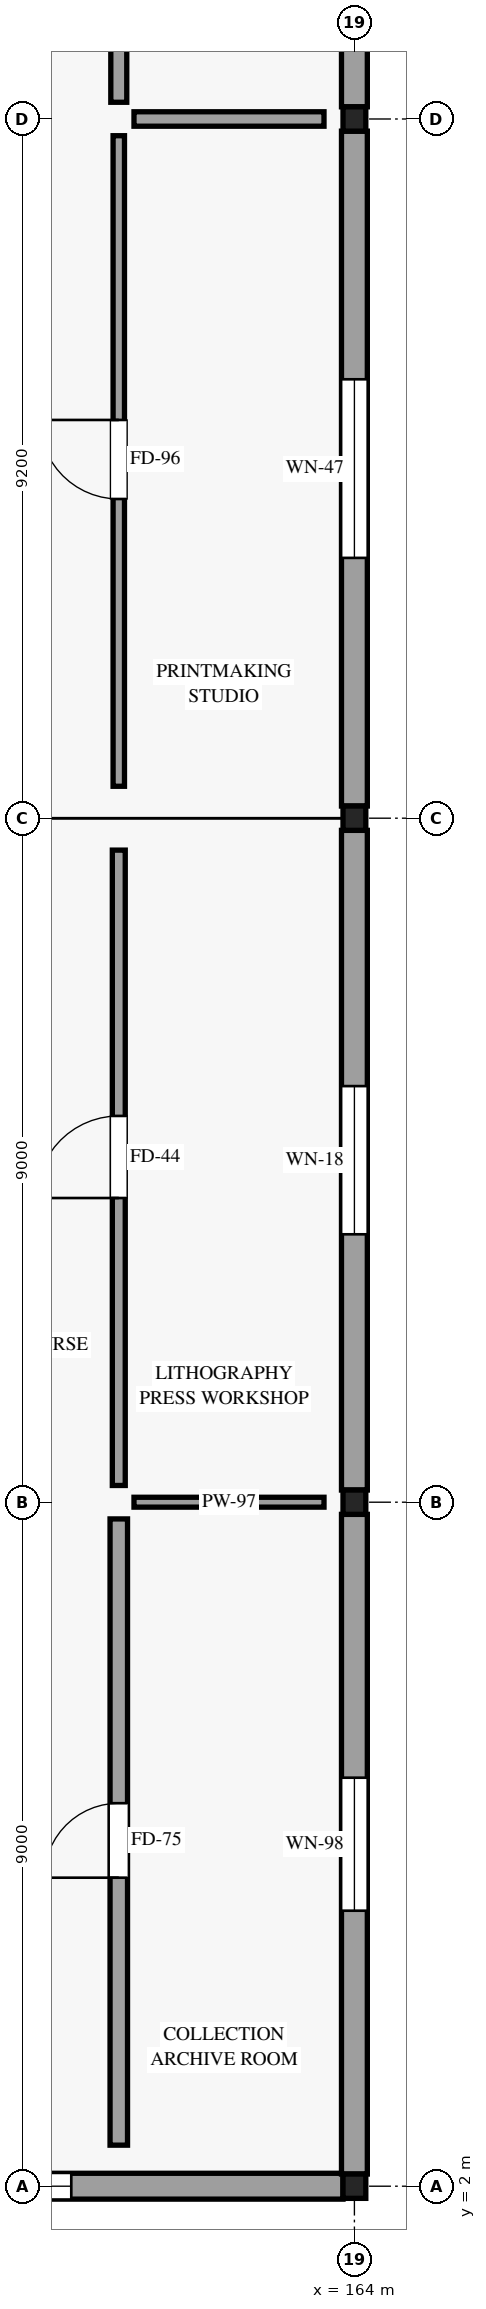
"""IFC4 building model, lengths in metres.
Left out: names, types, materials, properties, quantities, classifications, styles, units other than length and angle.
Written with IfcOpenShell. Run it as: python <this file> out.ifc"""

import sys

from ifc_helpers import new_model, si_unit, direction, frame, frame_2d, origin, origin_2d, place, context, subcontext, project, spatial, rectangle, i_section, extrude, element, fill, save


model = new_model("IFC4")
c1 = context("Model", 3, precision=1e-05, world=origin(), true_north=direction((0.0, 1.0)))
c2 = subcontext(c1, "Body", "Model", "MODEL_VIEW")
j1 = project(units=[si_unit("LENGTHUNIT", "METRE"), si_unit("PLANEANGLEUNIT", "RADIAN")], contexts=[c1])
p1 = place(None, origin())
s1 = spatial("IfcSite", under=j1, at=p1, CompositionType="ELEMENT")
p2 = place(p1, origin())
s2 = spatial("IfcBuilding", under=s1, at=p2, CompositionType="ELEMENT")
p3 = place(p2, frame((0.0, 0.0, 5.4)))
s3 = spatial("IfcBuildingStorey", under=s2, at=p3, CompositionType="ELEMENT", Elevation=5.4)
for number, where, z_axis, x_axis in (
    (1, (164.0, 2.0, 0.0), (0.0, 0.0, 1.0), (1.0, 0.0, 0.0)),
    (2, (164.0, 11.0, 0.0), (0.0, 0.0, 1.0), (1.0, 0.0, 0.0)),
    (3, (164.0, 20.0, 0.0), (0.0, 0.0, 1.0), (1.0, 0.0, 0.0)),
    (4, (164.0, 29.2, 0.0), (0.0, 0.0, 1.0), (1.0, 0.0, 0.0)),
):
    element("IfcColumn", number, at=place(p3, frame(where, z_axis=z_axis, x_axis=x_axis)), inside=s3, PredefinedType="COLUMN", context=c2, shape_type="SweptSolid", body=[
        extrude(i_section(OverallWidth=0.3, OverallDepth=0.32, WebThickness=0.011, FlangeThickness=0.021, FilletRadius=0.027, at=origin_2d()), origin(), (0.0, 0.0, 1.0), 4.8),
    ])
p4 = place(p3, frame((155.15, 2.0, 0.0), z_axis=(0.0, 0.0, 1.0), x_axis=(1.0, 0.0, 0.0)))
e5 = element("IfcWall", 5, at=p4, inside=s3, PredefinedType="STANDARD", context=c2, shape_type="SweptSolid", body=[
    extrude(rectangle(XDim=8.7, YDim=0.34, at=frame_2d((4.35, 0.0))), origin(), (0.0, 0.0, 1.0), 3.985),
])
p5 = place(p4, frame((5.125, 0.0, 0.85), z_axis=(0.0, 0.0, 1.0), x_axis=(-1.0, 0.0, 0.0)))
e6 = element("IfcOpeningElement", 6, at=p5, cuts=e5, PredefinedType="OPENING", context=c2, shape_type="SweptSolid", body=[
    extrude(rectangle(XDim=1.55, YDim=1.95, at=frame_2d((0.775, 0.975))), frame((0.0, 0.18, 0.0), z_axis=(0.0, -1.0, 0.0), x_axis=(1.0, 0.0, 0.0)), (0.0, 0.0, 1.0), 0.36),
])
p6 = place(p3, frame((164.0, 2.16, 0.0), z_axis=(0.0, 0.0, 1.0), x_axis=(0.0, 1.0, 0.0)))
e7 = element("IfcWall", 7, at=p6, inside=s3, PredefinedType="STANDARD", context=c2, shape_type="SweptSolid", body=[
    extrude(rectangle(XDim=8.68, YDim=0.34, at=frame_2d((4.34, 0.0))), origin(), (0.0, 0.0, 1.0), 3.985),
])
p7 = place(p6, frame((5.215, 0.0, 0.85), z_axis=(0.0, 0.0, 1.0), x_axis=(-1.0, 0.0, 0.0)))
e8 = element("IfcOpeningElement", 8, at=p7, cuts=e7, PredefinedType="OPENING", context=c2, shape_type="SweptSolid", body=[
    extrude(rectangle(XDim=1.75, YDim=2.05, at=frame_2d((0.875, 1.025))), frame((0.0, 0.18, 0.0), z_axis=(0.0, -1.0, 0.0), x_axis=(1.0, 0.0, 0.0)), (0.0, 0.0, 1.0), 0.36),
])
p8 = place(p3, frame((164.0, 11.16, 0.0), z_axis=(0.0, 0.0, 1.0), x_axis=(0.0, 1.0, 0.0)))
e9 = element("IfcWall", 9, at=p8, inside=s3, PredefinedType="STANDARD", context=c2, shape_type="SweptSolid", body=[
    extrude(rectangle(XDim=8.68, YDim=0.34, at=frame_2d((4.34, 0.0))), origin(), (0.0, 0.0, 1.0), 3.985),
])
p9 = place(p8, frame((5.315, 0.0, 0.85), z_axis=(0.0, 0.0, 1.0), x_axis=(-1.0, 0.0, 0.0)))
e10 = element("IfcOpeningElement", 10, at=p9, cuts=e9, PredefinedType="OPENING", context=c2, shape_type="SweptSolid", body=[
    extrude(rectangle(XDim=1.95, YDim=2.15, at=frame_2d((0.975, 1.075))), frame((0.0, 0.18, 0.0), z_axis=(0.0, -1.0, 0.0), x_axis=(1.0, 0.0, 0.0)), (0.0, 0.0, 1.0), 0.36),
])
p10 = place(p3, frame((164.0, 20.16, 0.0), z_axis=(0.0, 0.0, 1.0), x_axis=(0.0, 1.0, 0.0)))
e11 = element("IfcWall", 11, at=p10, inside=s3, PredefinedType="STANDARD", context=c2, shape_type="SweptSolid", body=[
    extrude(rectangle(XDim=8.88, YDim=0.34, at=frame_2d((4.44, 0.0))), origin(), (0.0, 0.0, 1.0), 3.985),
])
p11 = place(p10, frame((5.615, 0.0, 0.85), z_axis=(0.0, 0.0, 1.0), x_axis=(-1.0, 0.0, 0.0)))
e12 = element("IfcOpeningElement", 12, at=p11, cuts=e11, PredefinedType="OPENING", context=c2, shape_type="SweptSolid", body=[
    extrude(rectangle(XDim=2.35, YDim=2.35, at=frame_2d((1.175, 1.175))), frame((0.0, 0.18, 0.0), z_axis=(0.0, -1.0, 0.0), x_axis=(1.0, 0.0, 0.0)), (0.0, 0.0, 1.0), 0.36),
])
p12 = place(p3, frame((164.0, 29.36, 0.0), z_axis=(0.0, 0.0, 1.0), x_axis=(0.0, 1.0, 0.0)))
e13 = element("IfcWall", 13, at=p12, inside=s3, PredefinedType="STANDARD", context=c2, shape_type="SweptSolid", body=[
    extrude(rectangle(XDim=8.88, YDim=0.34, at=frame_2d((4.44, 0.0))), origin(), (0.0, 0.0, 1.0), 3.985),
])
p13 = place(p12, frame((5.715, 0.0, 0.85), z_axis=(0.0, 0.0, 1.0), x_axis=(-1.0, 0.0, 0.0)))
e14 = element("IfcOpeningElement", 14, at=p13, cuts=e13, PredefinedType="OPENING", context=c2, shape_type="SweptSolid", body=[
    extrude(rectangle(XDim=2.55, YDim=2.4, at=frame_2d((1.275, 1.2))), frame((0.0, 0.18, 0.0), z_axis=(0.0, -1.0, 0.0), x_axis=(1.0, 0.0, 0.0)), (0.0, 0.0, 1.0), 0.36),
])
p14 = place(p3, frame((160.9, 2.54, 0.0), z_axis=(0.0, 0.0, 1.0), x_axis=(0.0, 1.0, 0.0)))
e15 = element("IfcWall", 15, at=p14, inside=s3, PredefinedType="PARTITIONING", context=c2, shape_type="SweptSolid", body=[
    extrude(rectangle(XDim=8.24, YDim=0.23, at=frame_2d((4.12, 0.0))), origin(), (0.0, 0.0, 1.0), 3.985),
])
p15 = place(p14, frame((3.519, 0.0, 0.0)))
e16 = element("IfcOpeningElement", 16, at=p15, cuts=e15, PredefinedType="OPENING", context=c2, shape_type="SweptSolid", body=[
    extrude(rectangle(XDim=0.98, YDim=2.18, at=frame_2d((0.49, 1.09))), frame((0.0, 0.125, 0.0), z_axis=(0.0, -1.0, 0.0), x_axis=(1.0, 0.0, 0.0)), (0.0, 0.0, 1.0), 0.25),
])
p16 = place(p3, frame((161.1, 11.0, 0.0), z_axis=(0.0, 0.0, 1.0), x_axis=(1.0, 0.0, 0.0)))
e17 = element("IfcWall", 17, at=p16, inside=s3, PredefinedType="PARTITIONING", context=c2, shape_type="SweptSolid", body=[
    extrude(rectangle(XDim=2.5, YDim=0.13, at=frame_2d((1.25, 0.0))), origin(), (0.0, 0.0, 1.0), 3.985),
])
p17 = place(p3, frame((160.9, 20.42, 0.0), z_axis=(0.0, 0.0, 1.0), x_axis=(0.0, 1.0, 0.0)))
e18 = element("IfcWall", 18, at=p17, inside=s3, PredefinedType="PARTITIONING", context=c2, shape_type="SweptSolid", body=[
    extrude(rectangle(XDim=8.56, YDim=0.15, at=frame_2d((4.28, 0.0))), origin(), (0.0, 0.0, 1.0), 3.985),
])
p18 = place(p17, frame((3.78, 0.0, 0.0)))
e19 = element("IfcOpeningElement", 19, at=p18, cuts=e18, PredefinedType="OPENING", context=c2, shape_type="SweptSolid", body=[
    extrude(rectangle(XDim=1.04, YDim=2.22, at=frame_2d((0.52, 1.11))), frame((0.0, 0.085, 0.0), z_axis=(0.0, -1.0, 0.0), x_axis=(1.0, 0.0, 0.0)), (0.0, 0.0, 1.0), 0.17),
])
p19 = place(p3, frame((160.9, 11.22, 0.0), z_axis=(0.0, 0.0, 1.0), x_axis=(0.0, 1.0, 0.0)))
e20 = element("IfcWall", 20, at=p19, inside=s3, PredefinedType="PARTITIONING", context=c2, shape_type="SweptSolid", body=[
    extrude(rectangle(XDim=8.36, YDim=0.17, at=frame_2d((4.18, 0.0))), origin(), (0.0, 0.0, 1.0), 3.985),
])
p20 = place(p19, frame((3.782, 0.0, 0.0)))
e21 = element("IfcOpeningElement", 21, at=p20, cuts=e20, PredefinedType="OPENING", context=c2, shape_type="SweptSolid", body=[
    extrude(rectangle(XDim=1.08, YDim=2.24, at=frame_2d((0.54, 1.12))), frame((0.0, 0.095, 0.0), z_axis=(0.0, -1.0, 0.0), x_axis=(1.0, 0.0, 0.0)), (0.0, 0.0, 1.0), 0.19),
])
p21 = place(p3, frame((161.1, 29.2, 0.0), z_axis=(0.0, 0.0, 1.0), x_axis=(1.0, 0.0, 0.0)))
e22 = element("IfcWall", 22, at=p21, inside=s3, PredefinedType="PARTITIONING", context=c2, shape_type="SweptSolid", body=[
    extrude(rectangle(XDim=2.5, YDim=0.19, at=frame_2d((1.25, 0.0))), origin(), (0.0, 0.0, 1.0), 3.985),
])
p22 = place(p3, frame((160.9, 29.42, 0.0), z_axis=(0.0, 0.0, 1.0), x_axis=(0.0, 1.0, 0.0)))
e23 = element("IfcWall", 23, at=p22, inside=s3, PredefinedType="PARTITIONING", context=c2, shape_type="SweptSolid", body=[
    extrude(rectangle(XDim=8.76, YDim=0.21, at=frame_2d((4.38, 0.0))), origin(), (0.0, 0.0, 1.0), 3.985),
])
p23 = place(p22, frame((3.88, 0.0, 0.0)))
e24 = element("IfcOpeningElement", 24, at=p23, cuts=e23, PredefinedType="OPENING", context=c2, shape_type="SweptSolid", body=[
    extrude(rectangle(XDim=1.16, YDim=2.28, at=frame_2d((0.58, 1.14))), frame((0.0, 0.115, 0.0), z_axis=(0.0, -1.0, 0.0), x_axis=(1.0, 0.0, 0.0)), (0.0, 0.0, 1.0), 0.23),
])
p24 = place(p5, origin())
e25 = element("IfcWindow", 25, at=p24, inside=s3, PartitioningType="SINGLE_PANEL", PredefinedType="WINDOW", context=c2, shape_type="SweptSolid", body=[
    extrude(rectangle(XDim=1.55, YDim=1.95, at=frame_2d((0.775, 0.975))), frame((0.0, 0.03, 0.0), z_axis=(0.0, -1.0, 0.0), x_axis=(1.0, 0.0, 0.0)), (0.0, 0.0, 1.0), 0.06),
])
fill(e6, e25)
p25 = place(p7, origin())
e26 = element("IfcWindow", 26, at=p25, inside=s3, PartitioningType="SINGLE_PANEL", PredefinedType="WINDOW", context=c2, shape_type="SweptSolid", body=[
    extrude(rectangle(XDim=1.75, YDim=2.05, at=frame_2d((0.875, 1.025))), frame((0.0, 0.03, 0.0), z_axis=(0.0, -1.0, 0.0), x_axis=(1.0, 0.0, 0.0)), (0.0, 0.0, 1.0), 0.06),
])
fill(e8, e26)
p26 = place(p9, origin())
e27 = element("IfcWindow", 27, at=p26, inside=s3, PartitioningType="SINGLE_PANEL", PredefinedType="WINDOW", context=c2, shape_type="SweptSolid", body=[
    extrude(rectangle(XDim=1.95, YDim=2.15, at=frame_2d((0.975, 1.075))), frame((0.0, 0.03, 0.0), z_axis=(0.0, -1.0, 0.0), x_axis=(1.0, 0.0, 0.0)), (0.0, 0.0, 1.0), 0.06),
])
fill(e10, e27)
p27 = place(p11, origin())
e28 = element("IfcWindow", 28, at=p27, inside=s3, PartitioningType="SINGLE_PANEL", PredefinedType="WINDOW", context=c2, shape_type="SweptSolid", body=[
    extrude(rectangle(XDim=2.35, YDim=2.35, at=frame_2d((1.175, 1.175))), frame((0.0, 0.03, 0.0), z_axis=(0.0, -1.0, 0.0), x_axis=(1.0, 0.0, 0.0)), (0.0, 0.0, 1.0), 0.06),
])
fill(e12, e28)
p28 = place(p15, origin())
e29 = element("IfcDoor", 29, at=p28, inside=s3, OperationType="SINGLE_SWING_LEFT", PredefinedType="DOOR", context=c2, shape_type="SweptSolid", body=[
    extrude(rectangle(XDim=0.98, YDim=2.18, at=frame_2d((0.49, 1.09))), frame((0.0, 0.025, 0.0), z_axis=(0.0, -1.0, 0.0), x_axis=(1.0, 0.0, 0.0)), (0.0, 0.0, 1.0), 0.05),
])
fill(e16, e29)
p29 = place(p18, origin())
e30 = element("IfcDoor", 30, at=p29, inside=s3, OperationType="SINGLE_SWING_RIGHT", PredefinedType="DOOR", context=c2, shape_type="SweptSolid", body=[
    extrude(rectangle(XDim=1.04, YDim=2.22, at=frame_2d((0.52, 1.11))), frame((0.0, 0.025, 0.0), z_axis=(0.0, -1.0, 0.0), x_axis=(1.0, 0.0, 0.0)), (0.0, 0.0, 1.0), 0.05),
])
fill(e19, e30)
p30 = place(p20, origin())
e31 = element("IfcDoor", 31, at=p30, inside=s3, OperationType="SINGLE_SWING_LEFT", PredefinedType="DOOR", context=c2, shape_type="SweptSolid", body=[
    extrude(rectangle(XDim=1.08, YDim=2.24, at=frame_2d((0.54, 1.12))), frame((0.0, 0.025, 0.0), z_axis=(0.0, -1.0, 0.0), x_axis=(1.0, 0.0, 0.0)), (0.0, 0.0, 1.0), 0.05),
])
fill(e21, e31)
save(model, sys.argv[1])
